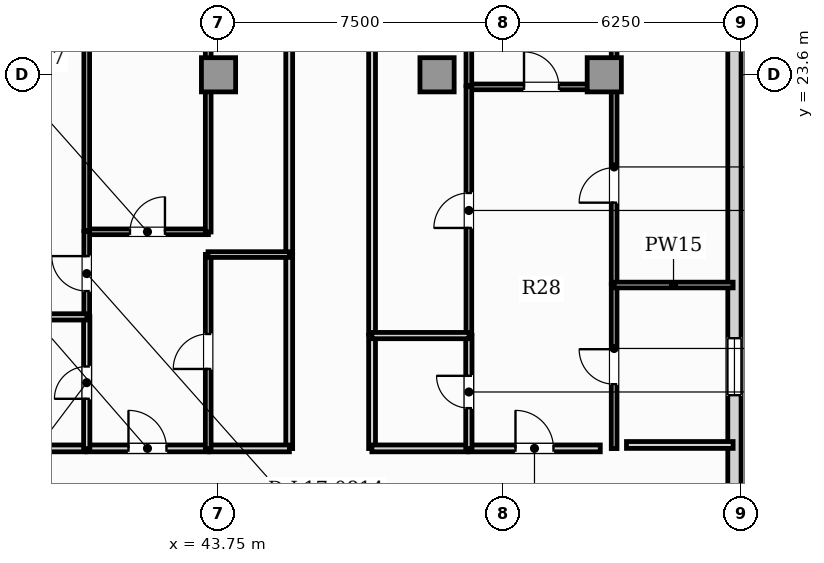
"""IFC4 building model, lengths in metres.
Left out: names, types, materials, properties, quantities, classifications, styles, units other than length and angle.
Written with IfcOpenShell. Run it as: python <this file> out.ifc"""

import sys

from ifc_helpers import new_model, si_unit, direction, frame, frame_2d, origin, origin_2d, place, context, subcontext, project, spatial, rectangle, extrude, element, fill, save


model = new_model("IFC4")
c1 = context("Model", 3, precision=1e-05, world=origin(), true_north=direction((0.0, 1.0)))
c2 = subcontext(c1, "Body", "Model", "MODEL_VIEW")
j1 = project(units=[si_unit("LENGTHUNIT", "METRE"), si_unit("PLANEANGLEUNIT", "RADIAN")], contexts=[c1])
p1 = place(None, origin())
s1 = spatial("IfcSite", under=j1, at=p1, CompositionType="ELEMENT")
p2 = place(p1, origin())
s2 = spatial("IfcBuilding", under=s1, at=p2, CompositionType="ELEMENT")
p3 = place(p2, frame((0.0, 0.0, 72.15)))
s3 = spatial("IfcBuildingStorey", under=s2, at=p3, CompositionType="ELEMENT", Elevation=72.15)
for number, where, z_axis, x_axis in (
    (1, (43.75, 23.6, 0.0), (0.0, 0.0, 1.0), (1.0, 0.0, 0.0)),
    (2, (49.5, 23.6, 0.0), (0.0, 0.0, 1.0), (1.0, 0.0, 0.0)),
    (3, (53.9, 23.6, 0.0), (0.0, 0.0, 1.0), (1.0, 0.0, 0.0)),
):
    element("IfcColumn", number, at=place(p3, frame(where, z_axis=z_axis, x_axis=x_axis)), inside=s3, PredefinedType="COLUMN", context=c2, shape_type="SweptSolid", body=[
        extrude(rectangle(XDim=0.9, YDim=0.9, at=origin_2d()), origin(), (0.0, 0.0, 1.0), 3.85),
    ])
p4 = place(p3, frame((57.325, 3.24, 0.0), z_axis=(0.0, 0.0, 1.0), x_axis=(0.0, 1.0, 0.0)))
e4 = element("IfcWall", 4, at=p4, inside=s3, PredefinedType="SOLIDWALL", context=c2, shape_type="SweptSolid", body=[
    extrude(rectangle(XDim=39.92, YDim=0.35, at=frame_2d((19.96, 0.0))), origin(), (0.0, 0.0, 1.0), 3.57),
])
p5 = place(p4, frame((35.68, 0.0, 0.95)))
e5 = element("IfcOpeningElement", 5, at=p5, cuts=e4, PredefinedType="OPENING", context=c2, shape_type="SweptSolid", body=[
    extrude(rectangle(XDim=0.9, YDim=1.5, at=frame_2d((0.45, 0.75))), frame((0.0, 0.185, 0.0), z_axis=(0.0, -1.0, 0.0), x_axis=(1.0, 0.0, 0.0)), (0.0, 0.0, 1.0), 0.37),
])
p6 = place(p4, frame((11.929, 0.0, 0.9)))
e6 = element("IfcOpeningElement", 6, at=p6, cuts=e4, PredefinedType="OPENING", context=c2, shape_type="SweptSolid", body=[
    extrude(rectangle(XDim=1.5, YDim=1.95, at=frame_2d((0.75, 0.975))), frame((0.0, 0.185, 0.0), z_axis=(0.0, -1.0, 0.0), x_axis=(1.0, 0.0, 0.0)), (0.0, 0.0, 1.0), 0.37),
])
p7 = place(p4, frame((24.354, 0.0, 0.9)))
e7 = element("IfcOpeningElement", 7, at=p7, cuts=e4, PredefinedType="OPENING", context=c2, shape_type="SweptSolid", body=[
    extrude(rectangle(XDim=1.5, YDim=1.95, at=frame_2d((0.75, 0.975))), frame((0.0, 0.185, 0.0), z_axis=(0.0, -1.0, 0.0), x_axis=(1.0, 0.0, 0.0)), (0.0, 0.0, 1.0), 0.37),
])
p8 = place(p4, frame((37.65, 0.0, 0.9)))
e8 = element("IfcOpeningElement", 8, at=p8, cuts=e4, PredefinedType="OPENING", context=c2, shape_type="SweptSolid", body=[
    extrude(rectangle(XDim=1.5, YDim=1.95, at=frame_2d((0.75, 0.975))), frame((0.0, 0.185, 0.0), z_axis=(0.0, -1.0, 0.0), x_axis=(1.0, 0.0, 0.0)), (0.0, 0.0, 1.0), 0.37),
])
p9 = place(p3, frame((50.332, 13.77, 0.0), z_axis=(0.0, 0.0, 1.0), x_axis=(1.0, 0.0, 0.0)))
e9 = element("IfcWall", 9, at=p9, inside=s3, PredefinedType="PARTITIONING", context=c2, shape_type="SweptSolid", body=[
    extrude(rectangle(XDim=3.463, YDim=0.18, at=frame_2d((1.731, 0.0))), origin(), (0.0, 0.0, 1.0), 3.57),
])
p10 = place(p9, frame((1.231, 0.0, 0.0)))
e10 = element("IfcOpeningElement", 10, at=p10, cuts=e9, PredefinedType="OPENING", context=c2, shape_type="SweptSolid", body=[
    extrude(rectangle(XDim=1.0, YDim=2.15, at=frame_2d((0.5, 1.075))), frame((0.0, 0.1, 0.0), z_axis=(0.0, -1.0, 0.0), x_axis=(1.0, 0.0, 0.0)), (0.0, 0.0, 1.0), 0.2),
])
p11 = place(p3, frame((47.79, 13.765, 0.0), z_axis=(0.0, 0.0, 1.0), x_axis=(0.0, 1.0, 0.0)))
e11 = element("IfcWall", 11, at=p11, inside=s3, PredefinedType="PARTITIONING", context=c2, shape_type="SweptSolid", body=[
    extrude(rectangle(XDim=2.978, YDim=0.18, at=frame_2d((1.489, 0.0))), origin(), (0.0, 0.0, 1.0), 3.57),
])
p12 = place(p3, frame((47.785, 13.77, 0.0), z_axis=(0.0, 0.0, 1.0), x_axis=(1.0, 0.0, 0.0)))
e12 = element("IfcWall", 12, at=p12, inside=s3, PredefinedType="PARTITIONING", context=c2, shape_type="SweptSolid", body=[
    extrude(rectangle(XDim=2.517, YDim=0.18, at=frame_2d((1.259, 0.0))), origin(), (0.0, 0.0, 1.0), 3.57),
])
p13 = place(p3, frame((47.79, 16.773, 0.0), z_axis=(0.0, 0.0, 1.0), x_axis=(0.0, 1.0, 0.0)))
e13 = element("IfcWall", 13, at=p13, inside=s3, PredefinedType="PARTITIONING", context=c2, shape_type="SweptSolid", body=[
    extrude(rectangle(XDim=11.122, YDim=0.18, at=frame_2d((5.561, 0.0))), origin(), (0.0, 0.0, 1.0), 3.57),
])
p14 = place(p3, frame((40.277, 13.77, 0.0), z_axis=(0.0, 0.0, 1.0), x_axis=(1.0, 0.0, 0.0)))
e14 = element("IfcWall", 14, at=p14, inside=s3, PredefinedType="PARTITIONING", context=c2, shape_type="SweptSolid", body=[
    extrude(rectangle(XDim=3.206, YDim=0.18, at=frame_2d((1.603, 0.0))), origin(), (0.0, 0.0, 1.0), 3.57),
])
p15 = place(p14, frame((1.103, 0.0, 0.0)))
e15 = element("IfcOpeningElement", 15, at=p15, cuts=e14, PredefinedType="OPENING", context=c2, shape_type="SweptSolid", body=[
    extrude(rectangle(XDim=1.0, YDim=2.15, at=frame_2d((0.5, 1.075))), frame((0.0, 0.1, 0.0), z_axis=(0.0, -1.0, 0.0), x_axis=(1.0, 0.0, 0.0)), (0.0, 0.0, 1.0), 0.2),
])
p16 = place(p3, frame((38.085, 13.77, 0.0), z_axis=(0.0, 0.0, 1.0), x_axis=(1.0, 0.0, 0.0)))
e16 = element("IfcWall", 16, at=p16, inside=s3, PredefinedType="PARTITIONING", context=c2, shape_type="SweptSolid", body=[
    extrude(rectangle(XDim=2.162, YDim=0.18, at=frame_2d((1.081, 0.0))), origin(), (0.0, 0.0, 1.0), 3.57),
])
p17 = place(p3, frame((45.61, 13.765, 0.0), z_axis=(0.0, 0.0, 1.0), x_axis=(0.0, 1.0, 0.0)))
e17 = element("IfcWall", 17, at=p17, inside=s3, PredefinedType="PARTITIONING", context=c2, shape_type="SweptSolid", body=[
    extrude(rectangle(XDim=5.11, YDim=0.18, at=frame_2d((2.555, 0.0))), origin(), (0.0, 0.0, 1.0), 3.57),
])
p18 = place(p3, frame((43.514, 13.77, 0.0), z_axis=(0.0, 0.0, 1.0), x_axis=(1.0, 0.0, 0.0)))
e18 = element("IfcWall", 18, at=p18, inside=s3, PredefinedType="PARTITIONING", context=c2, shape_type="SweptSolid", body=[
    extrude(rectangle(XDim=2.101, YDim=0.18, at=frame_2d((1.051, 0.0))), origin(), (0.0, 0.0, 1.0), 3.57),
])
p19 = place(p3, frame((45.61, 18.905, 0.0), z_axis=(0.0, 0.0, 1.0), x_axis=(0.0, 1.0, 0.0)))
e19 = element("IfcWall", 19, at=p19, inside=s3, PredefinedType="PARTITIONING", context=c2, shape_type="SweptSolid", body=[
    extrude(rectangle(XDim=8.99, YDim=0.18, at=frame_2d((4.495, 0.0))), origin(), (0.0, 0.0, 1.0), 3.57),
])
p20 = place(p3, frame((50.332, 23.282, 0.0), z_axis=(0.0, 0.0, 1.0), x_axis=(1.0, 0.0, 0.0)))
e20 = element("IfcWall", 20, at=p20, inside=s3, PredefinedType="PARTITIONING", context=c2, shape_type="SweptSolid", body=[
    extrude(rectangle(XDim=3.832, YDim=0.15, at=frame_2d((1.916, 0.0))), origin(), (0.0, 0.0, 1.0), 3.57),
])
p21 = place(p20, frame((1.456, 0.0, 0.0)))
e21 = element("IfcOpeningElement", 21, at=p21, cuts=e20, PredefinedType="OPENING", context=c2, shape_type="SweptSolid", body=[
    extrude(rectangle(XDim=0.92, YDim=2.1, at=frame_2d((0.46, 1.05))), frame((0.0, 0.085, 0.0), z_axis=(0.0, -1.0, 0.0), x_axis=(1.0, 0.0, 0.0)), (0.0, 0.0, 1.0), 0.17),
])
p22 = place(p3, frame((50.337, 13.765, 0.0), z_axis=(0.0, 0.0, 1.0), x_axis=(0.0, 1.0, 0.0)))
e22 = element("IfcWall", 22, at=p22, inside=s3, PredefinedType="PLUMBINGWALL", context=c2, shape_type="SweptSolid", body=[
    extrude(rectangle(XDim=2.978, YDim=0.165, at=frame_2d((1.489, 0.0))), origin(), (0.0, 0.0, 1.0), 3.57),
])
p23 = place(p22, frame((1.064, 0.0, 0.0)))
e23 = element("IfcOpeningElement", 23, at=p23, cuts=e22, PredefinedType="OPENING", context=c2, shape_type="SweptSolid", body=[
    extrude(rectangle(XDim=0.85, YDim=2.1, at=frame_2d((0.425, 1.05))), frame((0.0, 0.093, 0.0), z_axis=(0.0, -1.0, 0.0), x_axis=(1.0, 0.0, 0.0)), (0.0, 0.0, 1.0), 0.185),
])
p24 = place(p3, frame((50.337, 16.773, 0.0), z_axis=(0.0, 0.0, 1.0), x_axis=(0.0, 1.0, 0.0)))
e24 = element("IfcWall", 24, at=p24, inside=s3, PredefinedType="PARTITIONING", context=c2, shape_type="SweptSolid", body=[
    extrude(rectangle(XDim=6.514, YDim=0.15, at=frame_2d((3.257, 0.0))), origin(), (0.0, 0.0, 1.0), 3.57),
])
p25 = place(p24, frame((2.797, 0.0, 0.0)))
e25 = element("IfcOpeningElement", 25, at=p25, cuts=e24, PredefinedType="OPENING", context=c2, shape_type="SweptSolid", body=[
    extrude(rectangle(XDim=0.92, YDim=2.1, at=frame_2d((0.46, 1.05))), frame((0.0, 0.085, 0.0), z_axis=(0.0, -1.0, 0.0), x_axis=(1.0, 0.0, 0.0)), (0.0, 0.0, 1.0), 0.17),
])
p26 = place(p3, frame((54.159, 13.765, 0.0), z_axis=(0.0, 0.0, 1.0), x_axis=(0.0, 1.0, 0.0)))
e26 = element("IfcWall", 26, at=p26, inside=s3, PredefinedType="PARTITIONING", context=c2, shape_type="SweptSolid", body=[
    extrude(rectangle(XDim=4.309, YDim=0.15, at=frame_2d((2.154, 0.0))), origin(), (0.0, 0.0, 1.0), 3.57),
])
p27 = place(p26, frame((1.694, 0.0, 0.0)))
e27 = element("IfcOpeningElement", 27, at=p27, cuts=e26, PredefinedType="OPENING", context=c2, shape_type="SweptSolid", body=[
    extrude(rectangle(XDim=0.92, YDim=2.1, at=frame_2d((0.46, 1.05))), frame((0.0, 0.085, 0.0), z_axis=(0.0, -1.0, 0.0), x_axis=(1.0, 0.0, 0.0)), (0.0, 0.0, 1.0), 0.17),
])
p28 = place(p3, frame((54.159, 18.104, 0.0), z_axis=(0.0, 0.0, 1.0), x_axis=(0.0, 1.0, 0.0)))
e28 = element("IfcWall", 28, at=p28, inside=s3, PredefinedType="PARTITIONING", context=c2, shape_type="SweptSolid", body=[
    extrude(rectangle(XDim=5.184, YDim=0.15, at=frame_2d((2.592, 0.0))), origin(), (0.0, 0.0, 1.0), 3.57),
])
p29 = place(p28, frame((2.132, 0.0, 0.0)))
e29 = element("IfcOpeningElement", 29, at=p29, cuts=e28, PredefinedType="OPENING", context=c2, shape_type="SweptSolid", body=[
    extrude(rectangle(XDim=0.92, YDim=2.1, at=frame_2d((0.46, 1.05))), frame((0.0, 0.085, 0.0), z_axis=(0.0, -1.0, 0.0), x_axis=(1.0, 0.0, 0.0)), (0.0, 0.0, 1.0), 0.17),
])
p30 = place(p3, frame((50.337, 23.317, 0.0), z_axis=(0.0, 0.0, 1.0), x_axis=(0.0, 1.0, 0.0)))
e30 = element("IfcWall", 30, at=p30, inside=s3, PredefinedType="PARTITIONING", context=c2, shape_type="SweptSolid", body=[
    extrude(rectangle(XDim=15.308, YDim=0.15, at=frame_2d((7.654, 0.0))), origin(), (0.0, 0.0, 1.0), 3.57),
])
p31 = place(p30, frame((7.194, 0.0, 0.0)))
e31 = element("IfcOpeningElement", 31, at=p31, cuts=e30, PredefinedType="OPENING", context=c2, shape_type="SweptSolid", body=[
    extrude(rectangle(XDim=0.92, YDim=2.1, at=frame_2d((0.46, 1.05))), frame((0.0, 0.085, 0.0), z_axis=(0.0, -1.0, 0.0), x_axis=(1.0, 0.0, 0.0)), (0.0, 0.0, 1.0), 0.17),
])
p32 = place(p3, frame((54.159, 23.317, 0.0), z_axis=(0.0, 0.0, 1.0), x_axis=(0.0, 1.0, 0.0)))
e32 = element("IfcWall", 32, at=p32, inside=s3, PredefinedType="PARTITIONING", context=c2, shape_type="SweptSolid", body=[
    extrude(rectangle(XDim=15.308, YDim=0.15, at=frame_2d((7.654, 0.0))), origin(), (0.0, 0.0, 1.0), 3.57),
])
p33 = place(p32, frame((7.194, 0.0, 0.0)))
e33 = element("IfcOpeningElement", 33, at=p33, cuts=e32, PredefinedType="OPENING", context=c2, shape_type="SweptSolid", body=[
    extrude(rectangle(XDim=0.92, YDim=2.1, at=frame_2d((0.46, 1.05))), frame((0.0, 0.085, 0.0), z_axis=(0.0, -1.0, 0.0), x_axis=(1.0, 0.0, 0.0)), (0.0, 0.0, 1.0), 0.17),
])
p34 = place(p3, frame((47.785, 16.738, 0.0), z_axis=(0.0, 0.0, 1.0), x_axis=(1.0, 0.0, 0.0)))
e34 = element("IfcWall", 34, at=p34, inside=s3, PredefinedType="PLUMBINGWALL", context=c2, shape_type="SweptSolid", body=[
    extrude(rectangle(XDim=2.557, YDim=0.165, at=frame_2d((1.279, 0.0))), origin(), (0.0, 0.0, 1.0), 3.57),
])
p35 = place(p3, frame((54.154, 18.069, 0.0), z_axis=(0.0, 0.0, 1.0), x_axis=(1.0, 0.0, 0.0)))
e35 = element("IfcWall", 35, at=p35, inside=s3, PredefinedType="PARTITIONING", context=c2, shape_type="SweptSolid", body=[
    extrude(rectangle(XDim=3.136, YDim=0.15, at=frame_2d((1.568, 0.0))), origin(), (0.0, 0.0, 1.0), 3.57),
])
p36 = place(p3, frame((40.277, 19.469, 0.0), z_axis=(0.0, 0.0, 1.0), x_axis=(1.0, 0.0, 0.0)))
e36 = element("IfcWall", 36, at=p36, inside=s3, PredefinedType="PARTITIONING", context=c2, shape_type="SweptSolid", body=[
    extrude(rectangle(XDim=3.206, YDim=0.15, at=frame_2d((1.603, 0.0))), origin(), (0.0, 0.0, 1.0), 3.57),
])
p37 = place(p36, frame((1.143, 0.0, 0.0)))
e37 = element("IfcOpeningElement", 37, at=p37, cuts=e36, PredefinedType="OPENING", context=c2, shape_type="SweptSolid", body=[
    extrude(rectangle(XDim=0.92, YDim=2.1, at=frame_2d((0.46, 1.05))), frame((0.0, 0.085, 0.0), z_axis=(0.0, -1.0, 0.0), x_axis=(1.0, 0.0, 0.0)), (0.0, 0.0, 1.0), 0.17),
])
p38 = place(p3, frame((40.282, 13.765, 0.0), z_axis=(0.0, 0.0, 1.0), x_axis=(0.0, 1.0, 0.0)))
e38 = element("IfcWall", 38, at=p38, inside=s3, PredefinedType="PLUMBINGWALL", context=c2, shape_type="SweptSolid", body=[
    extrude(rectangle(XDim=3.47, YDim=0.165, at=frame_2d((1.735, 0.0))), origin(), (0.0, 0.0, 1.0), 3.57),
])
p39 = place(p38, frame((1.31, 0.0, 0.0)))
e39 = element("IfcOpeningElement", 39, at=p39, cuts=e38, PredefinedType="OPENING", context=c2, shape_type="SweptSolid", body=[
    extrude(rectangle(XDim=0.85, YDim=2.1, at=frame_2d((0.425, 1.05))), frame((0.0, 0.093, 0.0), z_axis=(0.0, -1.0, 0.0), x_axis=(1.0, 0.0, 0.0)), (0.0, 0.0, 1.0), 0.185),
])
p40 = place(p3, frame((40.282, 17.265, 0.0), z_axis=(0.0, 0.0, 1.0), x_axis=(0.0, 1.0, 0.0)))
e40 = element("IfcWall", 40, at=p40, inside=s3, PredefinedType="PARTITIONING", context=c2, shape_type="SweptSolid", body=[
    extrude(rectangle(XDim=2.209, YDim=0.15, at=frame_2d((1.104, 0.0))), origin(), (0.0, 0.0, 1.0), 3.57),
])
p41 = place(p40, frame((0.644, 0.0, 0.0)))
e41 = element("IfcOpeningElement", 41, at=p41, cuts=e40, PredefinedType="OPENING", context=c2, shape_type="SweptSolid", body=[
    extrude(rectangle(XDim=0.92, YDim=2.1, at=frame_2d((0.46, 1.05))), frame((0.0, 0.085, 0.0), z_axis=(0.0, -1.0, 0.0), x_axis=(1.0, 0.0, 0.0)), (0.0, 0.0, 1.0), 0.17),
])
p42 = place(p3, frame((43.479, 13.765, 0.0), z_axis=(0.0, 0.0, 1.0), x_axis=(0.0, 1.0, 0.0)))
e42 = element("IfcWall", 42, at=p42, inside=s3, PredefinedType="PARTITIONING", context=c2, shape_type="SweptSolid", body=[
    extrude(rectangle(XDim=5.11, YDim=0.15, at=frame_2d((2.555, 0.0))), origin(), (0.0, 0.0, 1.0), 3.57),
])
p43 = place(p42, frame((2.095, 0.0, 0.0)))
e43 = element("IfcOpeningElement", 43, at=p43, cuts=e42, PredefinedType="OPENING", context=c2, shape_type="SweptSolid", body=[
    extrude(rectangle(XDim=0.92, YDim=2.1, at=frame_2d((0.46, 1.05))), frame((0.0, 0.085, 0.0), z_axis=(0.0, -1.0, 0.0), x_axis=(1.0, 0.0, 0.0)), (0.0, 0.0, 1.0), 0.17),
])
p44 = place(p3, frame((40.282, 19.504, 0.0), z_axis=(0.0, 0.0, 1.0), x_axis=(0.0, 1.0, 0.0)))
e44 = element("IfcWall", 44, at=p44, inside=s3, PredefinedType="PARTITIONING", context=c2, shape_type="SweptSolid", body=[
    extrude(rectangle(XDim=19.121, YDim=0.15, at=frame_2d((9.561, 0.0))), origin(), (0.0, 0.0, 1.0), 3.57),
])
p45 = place(p44, frame((9.101, 0.0, 0.0)))
e45 = element("IfcOpeningElement", 45, at=p45, cuts=e44, PredefinedType="OPENING", context=c2, shape_type="SweptSolid", body=[
    extrude(rectangle(XDim=0.92, YDim=2.1, at=frame_2d((0.46, 1.05))), frame((0.0, 0.085, 0.0), z_axis=(0.0, -1.0, 0.0), x_axis=(1.0, 0.0, 0.0)), (0.0, 0.0, 1.0), 0.17),
])
p46 = place(p3, frame((43.479, 19.464, 0.0), z_axis=(0.0, 0.0, 1.0), x_axis=(0.0, 1.0, 0.0)))
e46 = element("IfcWall", 46, at=p46, inside=s3, PredefinedType="PARTITIONING", context=c2, shape_type="SweptSolid", body=[
    extrude(rectangle(XDim=19.161, YDim=0.15, at=frame_2d((9.581, 0.0))), origin(), (0.0, 0.0, 1.0), 3.57),
])
p47 = place(p46, frame((6.247, 0.0, 0.0)))
e47 = element("IfcOpeningElement", 47, at=p47, cuts=e46, PredefinedType="OPENING", context=c2, shape_type="SweptSolid", body=[
    extrude(rectangle(XDim=0.92, YDim=2.1, at=frame_2d((0.46, 1.05))), frame((0.0, 0.085, 0.0), z_axis=(0.0, -1.0, 0.0), x_axis=(1.0, 0.0, 0.0)), (0.0, 0.0, 1.0), 0.17),
])
p48 = place(p3, frame((38.085, 17.23, 0.0), z_axis=(0.0, 0.0, 1.0), x_axis=(1.0, 0.0, 0.0)))
e48 = element("IfcWall", 48, at=p48, inside=s3, PredefinedType="PLUMBINGWALL", context=c2, shape_type="SweptSolid", body=[
    extrude(rectangle(XDim=2.202, YDim=0.165, at=frame_2d((1.101, 0.0))), origin(), (0.0, 0.0, 1.0), 3.57),
])
p49 = place(p3, frame((43.474, 18.87, 0.0), z_axis=(0.0, 0.0, 1.0), x_axis=(1.0, 0.0, 0.0)))
e49 = element("IfcWall", 49, at=p49, inside=s3, PredefinedType="PARTITIONING", context=c2, shape_type="SweptSolid", body=[
    extrude(rectangle(XDim=2.141, YDim=0.15, at=frame_2d((1.071, 0.0))), origin(), (0.0, 0.0, 1.0), 3.57),
])
p50 = place(p3, frame((57.29, 13.86, 0.0), z_axis=(0.0, 0.0, 1.0), x_axis=(-1.0, 0.0, 0.0)))
e50 = element("IfcWall", 50, at=p50, inside=s3, PredefinedType="PARTITIONING", context=c2, shape_type="SweptSolid", body=[
    extrude(rectangle(XDim=2.806, YDim=0.18, at=frame_2d((1.403, 0.0))), origin(), (0.0, 0.0, 1.0), 3.57),
])
p51 = place(p6, origin())
e51 = element("IfcWindow", 51, at=p51, inside=s3, PartitioningType="SINGLE_PANEL", PredefinedType="WINDOW", context=c2, shape_type="SweptSolid", body=[
    extrude(rectangle(XDim=1.5, YDim=1.95, at=frame_2d((0.75, 0.975))), frame((0.0, 0.03, 0.0), z_axis=(0.0, -1.0, 0.0), x_axis=(1.0, 0.0, 0.0)), (0.0, 0.0, 1.0), 0.06),
])
fill(e6, e51)
p52 = place(p10, origin())
e52 = element("IfcDoor", 52, at=p52, inside=s3, OperationType="SINGLE_SWING_LEFT", PredefinedType="DOOR", context=c2, shape_type="SweptSolid", body=[
    extrude(rectangle(XDim=1.0, YDim=2.15, at=frame_2d((0.5, 1.075))), frame((0.0, 0.025, 0.0), z_axis=(0.0, -1.0, 0.0), x_axis=(1.0, 0.0, 0.0)), (0.0, 0.0, 1.0), 0.05),
])
fill(e10, e52)
p53 = place(p15, origin())
e53 = element("IfcDoor", 53, at=p53, inside=s3, OperationType="SINGLE_SWING_LEFT", PredefinedType="DOOR", context=c2, shape_type="SweptSolid", body=[
    extrude(rectangle(XDim=1.0, YDim=2.15, at=frame_2d((0.5, 1.075))), frame((0.0, 0.025, 0.0), z_axis=(0.0, -1.0, 0.0), x_axis=(1.0, 0.0, 0.0)), (0.0, 0.0, 1.0), 0.05),
])
fill(e15, e53)
p54 = place(p21, origin())
e54 = element("IfcDoor", 54, at=p54, inside=s3, OperationType="SINGLE_SWING_LEFT", PredefinedType="DOOR", context=c2, shape_type="SweptSolid", body=[
    extrude(rectangle(XDim=0.92, YDim=2.1, at=frame_2d((0.46, 1.05))), frame((0.0, 0.025, 0.0), z_axis=(0.0, -1.0, 0.0), x_axis=(1.0, 0.0, 0.0)), (0.0, 0.0, 1.0), 0.05),
])
fill(e21, e54)
p55 = place(p23, origin())
e55 = element("IfcDoor", 55, at=p55, inside=s3, OperationType="SINGLE_SWING_RIGHT", PredefinedType="DOOR", context=c2, shape_type="SweptSolid", body=[
    extrude(rectangle(XDim=0.85, YDim=2.1, at=frame_2d((0.425, 1.05))), frame((0.0, 0.025, 0.0), z_axis=(0.0, -1.0, 0.0), x_axis=(1.0, 0.0, 0.0)), (0.0, 0.0, 1.0), 0.05),
])
fill(e23, e55)
p56 = place(p25, origin())
e56 = element("IfcDoor", 56, at=p56, inside=s3, OperationType="SINGLE_SWING_LEFT", PredefinedType="DOOR", context=c2, shape_type="SweptSolid", body=[
    extrude(rectangle(XDim=0.92, YDim=2.1, at=frame_2d((0.46, 1.05))), frame((0.0, 0.025, 0.0), z_axis=(0.0, -1.0, 0.0), x_axis=(1.0, 0.0, 0.0)), (0.0, 0.0, 1.0), 0.05),
])
fill(e25, e56)
p57 = place(p27, origin())
e57 = element("IfcDoor", 57, at=p57, inside=s3, OperationType="SINGLE_SWING_RIGHT", PredefinedType="DOOR", context=c2, shape_type="SweptSolid", body=[
    extrude(rectangle(XDim=0.92, YDim=2.1, at=frame_2d((0.46, 1.05))), frame((0.0, 0.025, 0.0), z_axis=(0.0, -1.0, 0.0), x_axis=(1.0, 0.0, 0.0)), (0.0, 0.0, 1.0), 0.05),
])
fill(e27, e57)
p58 = place(p29, origin())
e58 = element("IfcDoor", 58, at=p58, inside=s3, OperationType="SINGLE_SWING_LEFT", PredefinedType="DOOR", context=c2, shape_type="SweptSolid", body=[
    extrude(rectangle(XDim=0.92, YDim=2.1, at=frame_2d((0.46, 1.05))), frame((0.0, 0.025, 0.0), z_axis=(0.0, -1.0, 0.0), x_axis=(1.0, 0.0, 0.0)), (0.0, 0.0, 1.0), 0.05),
])
fill(e29, e58)
p59 = place(p37, origin())
e59 = element("IfcDoor", 59, at=p59, inside=s3, OperationType="SINGLE_SWING_RIGHT", PredefinedType="DOOR", context=c2, shape_type="SweptSolid", body=[
    extrude(rectangle(XDim=0.92, YDim=2.1, at=frame_2d((0.46, 1.05))), frame((0.0, 0.025, 0.0), z_axis=(0.0, -1.0, 0.0), x_axis=(1.0, 0.0, 0.0)), (0.0, 0.0, 1.0), 0.05),
])
fill(e37, e59)
p60 = place(p39, origin())
e60 = element("IfcDoor", 60, at=p60, inside=s3, OperationType="SINGLE_SWING_LEFT", PredefinedType="DOOR", context=c2, shape_type="SweptSolid", body=[
    extrude(rectangle(XDim=0.85, YDim=2.1, at=frame_2d((0.425, 1.05))), frame((0.0, 0.025, 0.0), z_axis=(0.0, -1.0, 0.0), x_axis=(1.0, 0.0, 0.0)), (0.0, 0.0, 1.0), 0.05),
])
fill(e39, e60)
p61 = place(p41, origin())
e61 = element("IfcDoor", 61, at=p61, inside=s3, OperationType="SINGLE_SWING_RIGHT", PredefinedType="DOOR", context=c2, shape_type="SweptSolid", body=[
    extrude(rectangle(XDim=0.92, YDim=2.1, at=frame_2d((0.46, 1.05))), frame((0.0, 0.025, 0.0), z_axis=(0.0, -1.0, 0.0), x_axis=(1.0, 0.0, 0.0)), (0.0, 0.0, 1.0), 0.05),
])
fill(e41, e61)
p62 = place(p43, origin())
e62 = element("IfcDoor", 62, at=p62, inside=s3, OperationType="SINGLE_SWING_LEFT", PredefinedType="DOOR", context=c2, shape_type="SweptSolid", body=[
    extrude(rectangle(XDim=0.92, YDim=2.1, at=frame_2d((0.46, 1.05))), frame((0.0, 0.025, 0.0), z_axis=(0.0, -1.0, 0.0), x_axis=(1.0, 0.0, 0.0)), (0.0, 0.0, 1.0), 0.05),
])
fill(e43, e62)
save(model, sys.argv[1])
